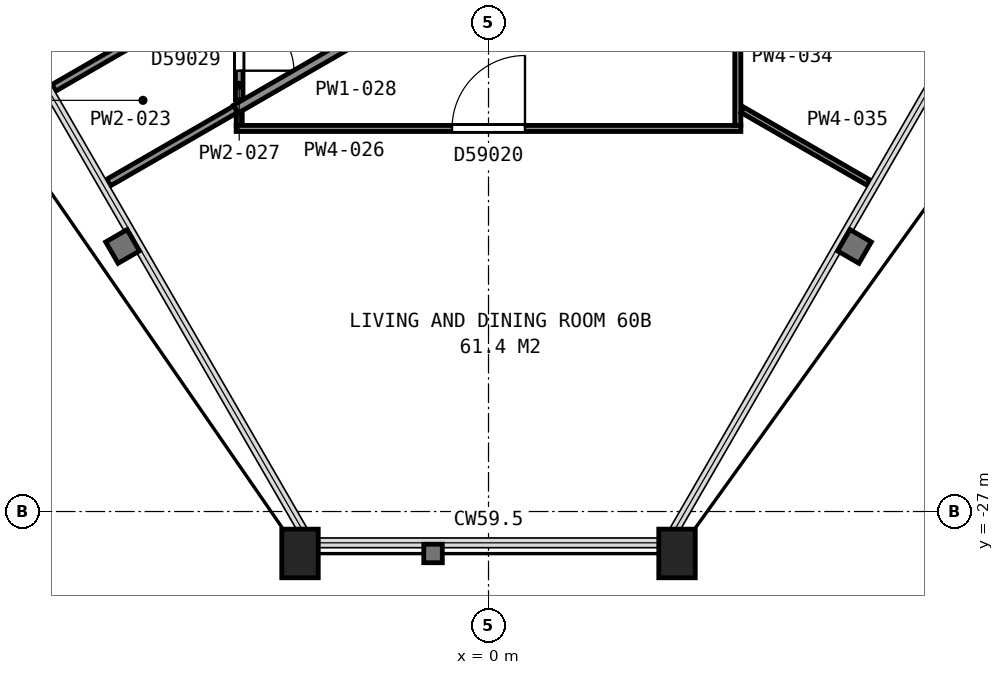
"""IFC4 building model, lengths in metres.
Left out: names, types, materials, properties, quantities, classifications, styles, units other than length and angle.
Written with IfcOpenShell. Run it as: python <this file> out.ifc"""

import sys

from ifc_helpers import new_model, si_unit, direction, frame, frame_2d, origin, origin_2d, place, context, subcontext, project, spatial, rectangle, hollow_rectangle, extrude, element, fill, save


model = new_model("IFC4")
c1 = context("Model", 3, precision=1e-05, world=origin(), true_north=direction((0.0, 1.0)))
c2 = subcontext(c1, "Body", "Model", "MODEL_VIEW")
j1 = project(units=[si_unit("LENGTHUNIT", "METRE"), si_unit("PLANEANGLEUNIT", "RADIAN")], contexts=[c1])
p1 = place(None, origin())
s1 = spatial("IfcSite", under=j1, at=p1, CompositionType="ELEMENT")
p2 = place(p1, origin())
s2 = spatial("IfcBuilding", under=s1, at=p2, CompositionType="ELEMENT")
p3 = place(p2, frame((0.0, 0.0, 239.7)))
s3 = spatial("IfcBuildingStorey", under=s2, at=p3, CompositionType="ELEMENT", Elevation=239.7)
for number, where, z_axis, x_axis in (
    (1, (-3.1, -27.69, 0.0), (0.0, 0.0, 1.0), (-1.0, 0.0, 0.0)),
    (2, (3.1, -27.69, 0.0), (0.0, 0.0, 1.0), (-1.0, 0.0, 0.0)),
):
    element("IfcColumn", number, at=place(p3, frame(where, z_axis=z_axis, x_axis=x_axis)), inside=s3, PredefinedType="COLUMN", context=c2, shape_type="SweptSolid", body=[
        extrude(hollow_rectangle(XDim=0.6, YDim=0.8, WallThickness=0.05, at=origin_2d()), origin(), (0.0, 0.0, 1.0), 3.635),
    ])
p4 = place(p3, frame((-7.148, -20.031, 0.0), z_axis=(0.0, 0.0, 1.0), x_axis=(0.865978603381, 0.500081051916, 0.0)))
e3 = element("IfcWall", 3, at=p4, inside=s3, PredefinedType="PARTITIONING", context=c2, shape_type="SweptSolid", body=[
    extrude(rectangle(XDim=3.477, YDim=0.125, at=frame_2d((1.739, 0.0))), origin(), (0.0, 0.0, 1.0), 2.713),
])
p5 = place(p3, frame((-6.248, -21.59, 0.0), z_axis=(0.0, 0.0, 1.0), x_axis=(0.866059450854, 0.499941024108, 0.0)))
e4 = element("IfcWall", 4, at=p5, inside=s3, PredefinedType="PARTITIONING", context=c2, shape_type="SweptSolid", body=[
    extrude(rectangle(XDim=2.417, YDim=0.125, at=frame_2d((1.208, 0.0))), origin(), (0.0, 0.0, 1.0), 2.713),
])
p6 = place(p3, frame((-4.1, -20.65, 0.0), z_axis=(0.0, 0.0, 1.0), x_axis=(0.0, 1.0, 0.0)))
e5 = element("IfcWall", 5, at=p6, inside=s3, PredefinedType="PARTITIONING", context=c2, shape_type="SweptSolid", body=[
    extrude(rectangle(XDim=0.2, YDim=0.1, at=frame_2d((0.1, 0.0))), origin(), (0.0, 0.0, 1.0), 2.713),
])
p7 = place(p3, frame((4.15, -20.7, 0.0), z_axis=(0.0, 0.0, 1.0), x_axis=(-1.0, 0.0, 0.0)))
e6 = element("IfcWall", 6, at=p7, inside=s3, PredefinedType="PARTITIONING", context=c2, shape_type="SweptSolid", body=[
    extrude(rectangle(XDim=8.3, YDim=0.1, at=frame_2d((4.15, 0.0))), origin(), (0.0, 0.0, 1.0), 2.713),
])
p8 = place(p7, frame((3.55, 0.0, 0.0)))
e7 = element("IfcOpeningElement", 7, at=p8, cuts=e6, PredefinedType="OPENING", context=c2, shape_type="SweptSolid", body=[
    extrude(rectangle(XDim=1.2, YDim=2.1, at=frame_2d((0.6, 1.05))), frame((0.0, 0.06, 0.0), z_axis=(0.0, -1.0, 0.0), x_axis=(1.0, 0.0, 0.0)), (0.0, 0.0, 1.0), 0.12),
])
p9 = place(p3, frame((-4.1, -18.376, 0.0), z_axis=(0.0, 0.0, 1.0), x_axis=(0.0, -1.0, 0.0)))
e8 = element("IfcWall", 8, at=p9, inside=s3, PredefinedType="PARTITIONING", context=c2, shape_type="SweptSolid", body=[
    extrude(rectangle(XDim=1.854, YDim=0.125, at=frame_2d((0.927, 0.0))), origin(), (0.0, 0.0, 1.0), 2.713),
])
p10 = place(p9, frame((0.474, 0.0, 0.0)))
e9 = element("IfcOpeningElement", 9, at=p10, cuts=e8, PredefinedType="OPENING", context=c2, shape_type="SweptSolid", body=[
    extrude(rectangle(XDim=0.9, YDim=2.1, at=frame_2d((0.45, 1.05))), frame((0.0, 0.073, 0.0), z_axis=(0.0, -1.0, 0.0), x_axis=(1.0, 0.0, 0.0)), (0.0, 0.0, 1.0), 0.145),
])
p11 = place(p3, frame((-4.154, -20.381, 0.0), z_axis=(0.0, 0.0, 1.0), x_axis=(0.86594123094, 0.500145763311, 0.0)))
e10 = element("IfcWall", 10, at=p11, inside=s3, PredefinedType="PARTITIONING", context=c2, shape_type="SweptSolid", body=[
    extrude(rectangle(XDim=2.962, YDim=0.15, at=frame_2d((1.481, 0.0))), origin(), (0.0, 0.0, 1.0), 2.713),
])
p12 = place(p3, frame((4.1, -15.539, 0.0), z_axis=(0.0, 0.0, 1.0), x_axis=(0.0, -1.0, 0.0)))
e11 = element("IfcWall", 11, at=p12, inside=s3, PredefinedType="PARTITIONING", context=c2, shape_type="SweptSolid", body=[
    extrude(rectangle(XDim=5.111, YDim=0.1, at=frame_2d((2.555, 0.0))), origin(), (0.0, 0.0, 1.0), 2.713),
])
p13 = place(p12, frame((1.961, 0.0, 0.0)))
e12 = element("IfcOpeningElement", 12, at=p13, cuts=e11, PredefinedType="OPENING", context=c2, shape_type="SweptSolid", body=[
    extrude(rectangle(XDim=0.9, YDim=2.1, at=frame_2d((0.45, 1.05))), frame((0.0, 0.06, 0.0), z_axis=(0.0, -1.0, 0.0), x_axis=(1.0, 0.0, 0.0)), (0.0, 0.0, 1.0), 0.12),
])
p14 = place(p3, frame((4.175, -20.393, 0.0), z_axis=(0.0, 0.0, 1.0), x_axis=(0.866030989016, -0.499990325971, 0.0)))
e13 = element("IfcWall", 13, at=p14, inside=s3, PredefinedType="PARTITIONING", context=c2, shape_type="SweptSolid", body=[
    extrude(rectangle(XDim=2.393, YDim=0.1, at=frame_2d((1.197, 0.0))), origin(), (0.0, 0.0, 1.0), 2.713),
])
p15 = place(p8, origin())
e14 = element("IfcDoor", 14, at=p15, inside=s3, OperationType="SINGLE_SWING_LEFT", PredefinedType="DOOR", context=c2, shape_type="SweptSolid", body=[
    extrude(rectangle(XDim=1.2, YDim=2.1, at=frame_2d((0.6, 1.05))), frame((0.0, 0.025, 0.0), z_axis=(0.0, -1.0, 0.0), x_axis=(1.0, 0.0, 0.0)), (0.0, 0.0, 1.0), 0.05),
])
fill(e7, e14)
p16 = place(p10, origin())
e15 = element("IfcDoor", 15, at=p16, inside=s3, OperationType="SINGLE_SWING_RIGHT", PredefinedType="DOOR", context=c2, shape_type="SweptSolid", body=[
    extrude(rectangle(XDim=0.9, YDim=2.1, at=frame_2d((0.45, 1.05))), frame((0.0, 0.025, 0.0), z_axis=(0.0, -1.0, 0.0), x_axis=(1.0, 0.0, 0.0)), (0.0, 0.0, 1.0), 0.05),
])
fill(e9, e15)
save(model, sys.argv[1])
